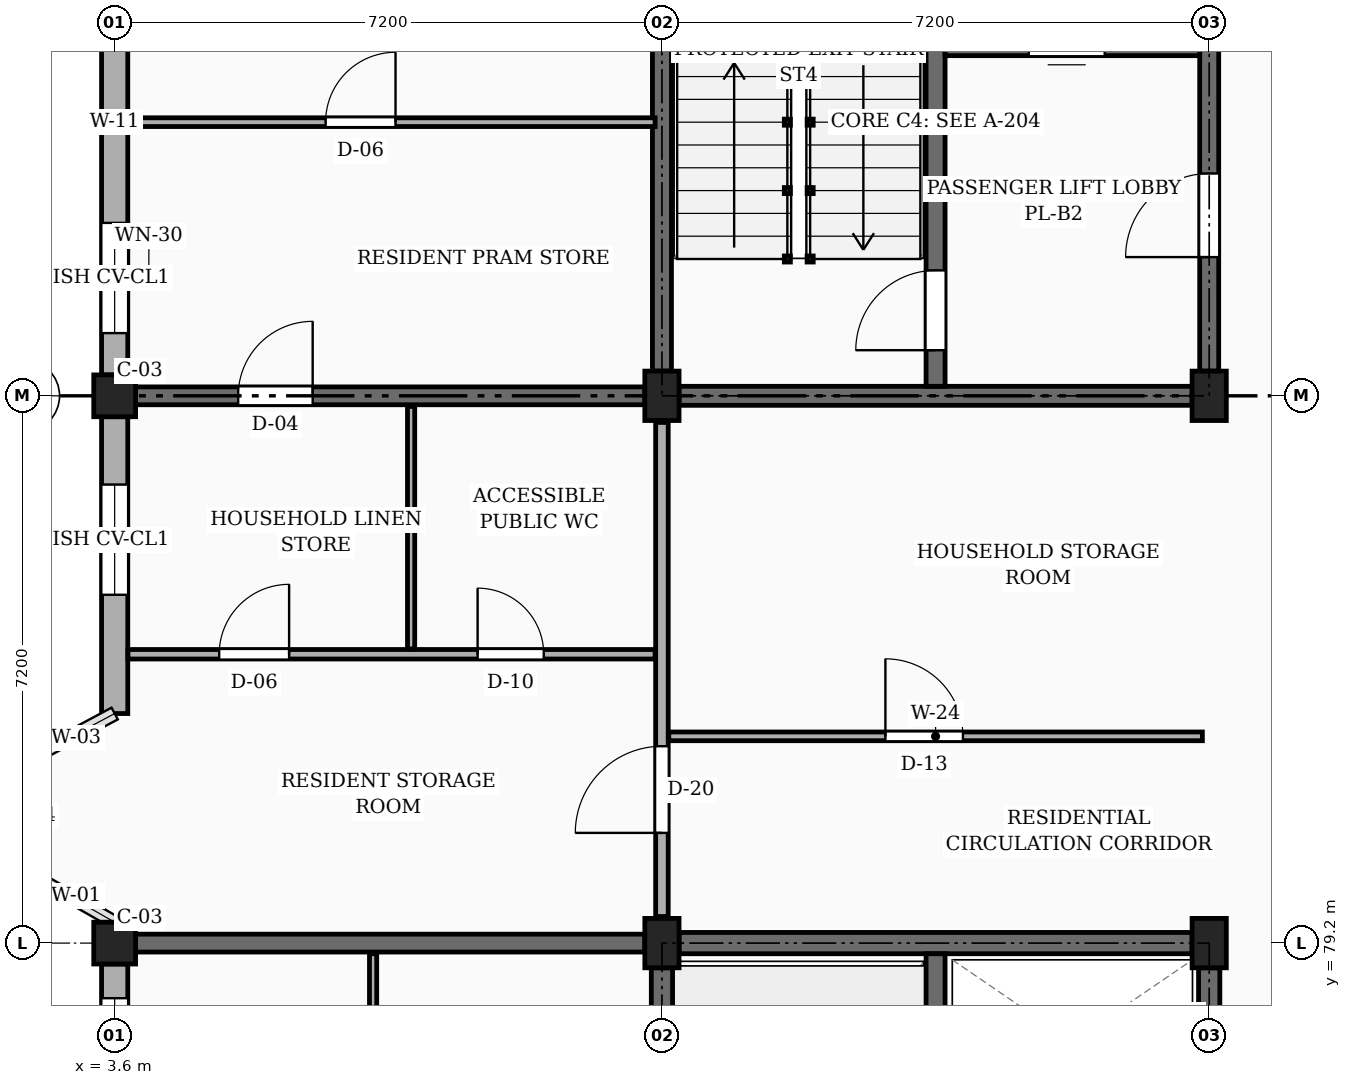
"""IFC4 building model, lengths in metres.
Left out: names, types, materials, properties, quantities, classifications, styles, units other than length and angle.
Written with IfcOpenShell. Run it as: python <this file> out.ifc"""

import sys

from ifc_helpers import new_model, si_unit, direction, frame, frame_2d, origin, origin_2d, place, context, subcontext, project, spatial, rectangle, extrude, element, fill, save


model = new_model("IFC4")
c1 = context("Model", 3, precision=1e-05, world=origin(), true_north=direction((0.0, 1.0)))
c2 = subcontext(c1, "Body", "Model", "MODEL_VIEW")
j1 = project(units=[si_unit("LENGTHUNIT", "METRE"), si_unit("PLANEANGLEUNIT", "RADIAN")], contexts=[c1])
p1 = place(None, origin())
s1 = spatial("IfcSite", under=j1, at=p1, CompositionType="ELEMENT")
p2 = place(p1, origin())
s2 = spatial("IfcBuilding", under=s1, at=p2, CompositionType="ELEMENT")
p3 = place(p2, frame((0.0, 0.0, 20.25)))
s3 = spatial("IfcBuildingStorey", under=s2, at=p3, CompositionType="ELEMENT", Elevation=20.25)
for number, where, z_axis, x_axis in (
    (1, (3.6, 79.2, 0.0), (0.0, 0.0, 1.0), (1.0, 0.0, 0.0)),
    (2, (3.6, 86.4, 0.0), (0.0, 0.0, 1.0), (1.0, 0.0, 0.0)),
):
    element("IfcColumn", number, at=place(p3, frame(where, z_axis=z_axis, x_axis=x_axis)), inside=s3, PredefinedType="COLUMN", context=c2, shape_type="SweptSolid", body=[
        extrude(rectangle(XDim=0.55, YDim=0.55, at=origin_2d()), origin(), (0.0, 0.0, 1.0), 3.15),
    ])
for number, where, z_axis, x_axis in (
    (3, (10.8, 79.2, 0.0), (0.0, 0.0, 1.0), (1.0, 0.0, 0.0)),
    (4, (10.8, 86.4, 0.0), (0.0, 0.0, 1.0), (1.0, 0.0, 0.0)),
    (5, (18.0, 79.2, 0.0), (0.0, 0.0, 1.0), (1.0, 0.0, 0.0)),
    (6, (18.0, 86.4, 0.0), (0.0, 0.0, 1.0), (1.0, 0.0, 0.0)),
):
    element("IfcColumn", number, at=place(p3, frame(where, z_axis=z_axis, x_axis=x_axis)), inside=s3, PredefinedType="COLUMN", context=c2, shape_type="SweptSolid", body=[
        extrude(rectangle(XDim=0.45, YDim=0.65, at=origin_2d()), origin(), (0.0, 0.0, 1.0), 3.15),
    ])
p4 = place(p3, frame((3.875, 79.2, 0.0), z_axis=(0.0, 0.0, 1.0), x_axis=(1.0, 0.0, 0.0)))
e7 = element("IfcWall", 7, at=p4, inside=s3, PredefinedType="SOLIDWALL", context=c2, shape_type="SweptSolid", body=[
    extrude(rectangle(XDim=6.7, YDim=0.235, at=frame_2d((3.35, 0.0))), origin(), (0.0, 0.0, 1.0), 2.21),
])
p5 = place(p3, frame((3.875, 86.4, 0.0), z_axis=(0.0, 0.0, 1.0), x_axis=(1.0, 0.0, 0.0)))
e8 = element("IfcWall", 8, at=p5, inside=s3, PredefinedType="SOLIDWALL", context=c2, shape_type="SweptSolid", body=[
    extrude(rectangle(XDim=6.7, YDim=0.235, at=frame_2d((3.35, 0.0))), origin(), (0.0, 0.0, 1.0), 2.21),
])
p6 = place(p5, frame((1.35, 0.0, 0.0)))
e9 = element("IfcOpeningElement", 9, at=p6, cuts=e8, PredefinedType="OPENING", context=c2, shape_type="SweptSolid", body=[
    extrude(rectangle(XDim=0.98, YDim=2.12, at=frame_2d((0.49, 1.06))), frame((0.0, 0.127, 0.0), z_axis=(0.0, -1.0, 0.0), x_axis=(1.0, 0.0, 0.0)), (0.0, 0.0, 1.0), 0.255),
])
p7 = place(p3, frame((3.6, 93.325, 0.0), z_axis=(0.0, 0.0, 1.0), x_axis=(0.0, -1.0, 0.0)))
e10 = element("IfcWall", 10, at=p7, inside=s3, PredefinedType="SOLIDWALL", context=c2, shape_type="SweptSolid", body=[
    extrude(rectangle(XDim=6.65, YDim=0.345, at=frame_2d((3.325, 0.0))), origin(), (0.0, 0.0, 1.0), 2.48),
])
p8 = place(p7, frame((0.45, 0.0, 0.78)))
e11 = element("IfcOpeningElement", 11, at=p8, cuts=e10, PredefinedType="OPENING", context=c2, shape_type="SweptSolid", body=[
    extrude(rectangle(XDim=1.25, YDim=1.44, at=frame_2d((0.625, 0.72))), frame((0.0, 0.183, 0.0), z_axis=(0.0, -1.0, 0.0), x_axis=(1.0, 0.0, 0.0)), (0.0, 0.0, 1.0), 0.365),
])
p9 = place(p7, frame((4.65, 0.0, 0.78)))
e12 = element("IfcOpeningElement", 12, at=p9, cuts=e10, PredefinedType="OPENING", context=c2, shape_type="SweptSolid", body=[
    extrude(rectangle(XDim=1.45, YDim=1.44, at=frame_2d((0.725, 0.72))), frame((0.0, 0.183, 0.0), z_axis=(0.0, -1.0, 0.0), x_axis=(1.0, 0.0, 0.0)), (0.0, 0.0, 1.0), 0.365),
])
p10 = place(p3, frame((3.6, 86.125, 0.0), z_axis=(0.0, 0.0, 1.0), x_axis=(0.0, -1.0, 0.0)))
e13 = element("IfcWall", 13, at=p10, inside=s3, PredefinedType="SOLIDWALL", context=c2, shape_type="SweptSolid", body=[
    extrude(rectangle(XDim=3.905, YDim=0.345, at=frame_2d((1.953, 0.0))), origin(), (0.0, 0.0, 1.0), 2.48),
])
p11 = place(p10, frame((0.893, 0.0, 0.78)))
e14 = element("IfcOpeningElement", 14, at=p11, cuts=e13, PredefinedType="OPENING", context=c2, shape_type="SweptSolid", body=[
    extrude(rectangle(XDim=1.45, YDim=1.44, at=frame_2d((0.725, 0.72))), frame((0.0, 0.183, 0.0), z_axis=(0.0, -1.0, 0.0), x_axis=(1.0, 0.0, 0.0)), (0.0, 0.0, 1.0), 0.365),
])
p12 = place(p3, frame((3.6, 78.925, 0.0), z_axis=(0.0, 0.0, 1.0), x_axis=(0.0, -1.0, 0.0)))
e15 = element("IfcWall", 15, at=p12, inside=s3, PredefinedType="SOLIDWALL", context=c2, shape_type="SweptSolid", body=[
    extrude(rectangle(XDim=6.65, YDim=0.345, at=frame_2d((3.325, 0.0))), origin(), (0.0, 0.0, 1.0), 2.48),
])
p13 = place(p12, frame((0.45, 0.0, 0.78)))
e16 = element("IfcOpeningElement", 16, at=p13, cuts=e15, PredefinedType="OPENING", context=c2, shape_type="SweptSolid", body=[
    extrude(rectangle(XDim=0.85, YDim=1.15, at=frame_2d((0.425, 0.575))), frame((0.0, 0.183, 0.0), z_axis=(0.0, -1.0, 0.0), x_axis=(1.0, 0.0, 0.0)), (0.0, 0.0, 1.0), 0.365),
])
p14 = place(p12, frame((4.65, 0.0, 0.78)))
e17 = element("IfcOpeningElement", 17, at=p14, cuts=e15, PredefinedType="OPENING", context=c2, shape_type="SweptSolid", body=[
    extrude(rectangle(XDim=1.0, YDim=1.15, at=frame_2d((0.5, 0.575))), frame((0.0, 0.183, 0.0), z_axis=(0.0, -1.0, 0.0), x_axis=(1.0, 0.0, 0.0)), (0.0, 0.0, 1.0), 0.365),
])
p15 = place(p3, frame((10.8, 72.325, 0.0), z_axis=(0.0, 0.0, 1.0), x_axis=(0.0, 1.0, 0.0)))
e18 = element("IfcWall", 18, at=p15, inside=s3, PredefinedType="SHEAR", context=c2, shape_type="SweptSolid", body=[
    extrude(rectangle(XDim=6.55, YDim=0.28, at=frame_2d((3.275, 0.0))), origin(), (0.0, 0.0, 1.0), 2.91),
])
p16 = place(p3, frame((11.025, 79.2, 0.0), z_axis=(0.0, 0.0, 1.0), x_axis=(1.0, 0.0, 0.0)))
e19 = element("IfcWall", 19, at=p16, inside=s3, PredefinedType="SHEAR", context=c2, shape_type="SweptSolid", body=[
    extrude(rectangle(XDim=6.75, YDim=0.28, at=frame_2d((3.375, 0.0))), origin(), (0.0, 0.0, 1.0), 2.91),
])
p17 = place(p3, frame((18.0, 72.325, 0.0), z_axis=(0.0, 0.0, 1.0), x_axis=(0.0, 1.0, 0.0)))
e20 = element("IfcWall", 20, at=p17, inside=s3, PredefinedType="SHEAR", context=c2, shape_type="SweptSolid", body=[
    extrude(rectangle(XDim=6.55, YDim=0.28, at=frame_2d((3.275, 0.0))), origin(), (0.0, 0.0, 1.0), 2.91),
])
p18 = place(p17, frame((1.5, 0.0, 0.0)))
e21 = element("IfcOpeningElement", 21, at=p18, cuts=e20, PredefinedType="OPENING", context=c2, shape_type="SweptSolid", body=[
    extrude(rectangle(XDim=1.1, YDim=2.15, at=frame_2d((0.55, 1.075))), frame((0.0, 0.15, 0.0), z_axis=(0.0, -1.0, 0.0), x_axis=(1.0, 0.0, 0.0)), (0.0, 0.0, 1.0), 0.3),
])
p19 = place(p3, frame((14.4, 72.14, 0.0), z_axis=(0.0, 0.0, 1.0), x_axis=(0.0, 1.0, 0.0)))
e22 = element("IfcWall", 22, at=p19, inside=s3, PredefinedType="SHEAR", context=c2, shape_type="SweptSolid", body=[
    extrude(rectangle(XDim=6.92, YDim=0.25, at=frame_2d((3.46, 0.0))), origin(), (0.0, 0.0, 1.0), 2.91),
])
p20 = place(p19, frame((0.46, 0.0, 0.0)))
e23 = element("IfcOpeningElement", 23, at=p20, cuts=e22, PredefinedType="OPENING", context=c2, shape_type="SweptSolid", body=[
    extrude(rectangle(XDim=1.05, YDim=2.15, at=frame_2d((0.525, 1.075))), frame((0.0, 0.135, 0.0), z_axis=(0.0, -1.0, 0.0), x_axis=(1.0, 0.0, 0.0)), (0.0, 0.0, 1.0), 0.27),
])
p21 = place(p3, frame((10.8, 86.725, 0.0), z_axis=(0.0, 0.0, 1.0), x_axis=(0.0, 1.0, 0.0)))
e24 = element("IfcWall", 24, at=p21, inside=s3, PredefinedType="SHEAR", context=c2, shape_type="SweptSolid", body=[
    extrude(rectangle(XDim=6.6, YDim=0.25, at=frame_2d((3.3, 0.0))), origin(), (0.0, 0.0, 1.0), 2.91),
])
p22 = place(p3, frame((18.0, 86.725, 0.0), z_axis=(0.0, 0.0, 1.0), x_axis=(0.0, 1.0, 0.0)))
e25 = element("IfcWall", 25, at=p22, inside=s3, PredefinedType="SHEAR", context=c2, shape_type="SweptSolid", body=[
    extrude(rectangle(XDim=6.6, YDim=0.25, at=frame_2d((3.3, 0.0))), origin(), (0.0, 0.0, 1.0), 2.91),
])
p23 = place(p22, frame((1.5, 0.0, 0.0)))
e26 = element("IfcOpeningElement", 26, at=p23, cuts=e25, PredefinedType="OPENING", context=c2, shape_type="SweptSolid", body=[
    extrude(rectangle(XDim=1.1, YDim=2.15, at=frame_2d((0.55, 1.075))), frame((0.0, 0.135, 0.0), z_axis=(0.0, -1.0, 0.0), x_axis=(1.0, 0.0, 0.0)), (0.0, 0.0, 1.0), 0.27),
])
p24 = place(p3, frame((11.025, 86.4, 0.0), z_axis=(0.0, 0.0, 1.0), x_axis=(1.0, 0.0, 0.0)))
e27 = element("IfcWall", 27, at=p24, inside=s3, PredefinedType="SHEAR", context=c2, shape_type="SweptSolid", body=[
    extrude(rectangle(XDim=6.75, YDim=0.25, at=frame_2d((3.375, 0.0))), origin(), (0.0, 0.0, 1.0), 2.91),
])
p25 = place(p3, frame((14.4, 86.525, 0.0), z_axis=(0.0, 0.0, 1.0), x_axis=(0.0, 1.0, 0.0)))
e28 = element("IfcWall", 28, at=p25, inside=s3, PredefinedType="SHEAR", context=c2, shape_type="SweptSolid", body=[
    extrude(rectangle(XDim=6.915, YDim=0.25, at=frame_2d((3.458, 0.0))), origin(), (0.0, 0.0, 1.0), 2.91),
])
p26 = place(p25, frame((0.475, 0.0, 0.0)))
e29 = element("IfcOpeningElement", 29, at=p26, cuts=e28, PredefinedType="OPENING", context=c2, shape_type="SweptSolid", body=[
    extrude(rectangle(XDim=1.05, YDim=2.15, at=frame_2d((0.525, 1.075))), frame((0.0, 0.135, 0.0), z_axis=(0.0, -1.0, 0.0), x_axis=(1.0, 0.0, 0.0)), (0.0, 0.0, 1.0), 0.27),
])
p27 = place(p3, frame((14.525, 91.0, 0.0), z_axis=(0.0, 0.0, 1.0), x_axis=(1.0, 0.0, 0.0)))
e30 = element("IfcWall", 30, at=p27, inside=s3, PredefinedType="SHEAR", context=c2, shape_type="SweptSolid", body=[
    extrude(rectangle(XDim=3.35, YDim=0.25, at=frame_2d((1.675, 0.0))), origin(), (0.0, 0.0, 1.0), 2.91),
])
p28 = place(p27, frame((1.1, 0.0, 0.0)))
e31 = element("IfcOpeningElement", 31, at=p28, cuts=e30, PredefinedType="OPENING", context=c2, shape_type="SweptSolid", body=[
    extrude(rectangle(XDim=1.0, YDim=2.2, at=frame_2d((0.5, 1.1))), frame((0.0, 0.135, 0.0), z_axis=(0.0, -1.0, 0.0), x_axis=(1.0, 0.0, 0.0)), (0.0, 0.0, 1.0), 0.27),
])
p29 = place(p3, frame((10.8, 79.55, 0.0), z_axis=(0.0, 0.0, 1.0), x_axis=(0.0, 1.0, 0.0)))
e32 = element("IfcWall", 32, at=p29, inside=s3, PredefinedType="PARTITIONING", context=c2, shape_type="SweptSolid", body=[
    extrude(rectangle(XDim=6.5, YDim=0.165, at=frame_2d((3.25, 0.0))), origin(), (0.0, 0.0, 1.0), 2.345),
])
p30 = place(p29, frame((1.1, 0.0, 0.0)))
e33 = element("IfcOpeningElement", 33, at=p30, cuts=e32, PredefinedType="OPENING", context=c2, shape_type="SweptSolid", body=[
    extrude(rectangle(XDim=1.14, YDim=2.18, at=frame_2d((0.57, 1.09))), frame((0.0, 0.093, 0.0), z_axis=(0.0, -1.0, 0.0), x_axis=(1.0, 0.0, 0.0)), (0.0, 0.0, 1.0), 0.185),
])
p31 = place(p3, frame((7.0, 75.37, 0.0), z_axis=(0.0, 0.0, 1.0), x_axis=(0.0, 1.0, 0.0)))
e34 = element("IfcWall", 34, at=p31, inside=s3, PredefinedType="PARTITIONING", context=c2, shape_type="SweptSolid", body=[
    extrude(rectangle(XDim=3.69, YDim=0.095, at=frame_2d((1.845, 0.0))), origin(), (0.0, 0.0, 1.0), 2.345),
])
p32 = place(p3, frame((10.89, 81.92, 0.0), z_axis=(0.0, 0.0, 1.0), x_axis=(1.0, 0.0, 0.0)))
e35 = element("IfcWall", 35, at=p32, inside=s3, PredefinedType="PARTITIONING", context=c2, shape_type="SweptSolid", body=[
    extrude(rectangle(XDim=7.02, YDim=0.115, at=frame_2d((3.51, 0.0))), origin(), (0.0, 0.0, 1.0), 2.345),
])
p33 = place(p32, frame((2.85, 0.0, 0.0)))
e36 = element("IfcOpeningElement", 36, at=p33, cuts=e35, PredefinedType="OPENING", context=c2, shape_type="SweptSolid", body=[
    extrude(rectangle(XDim=1.02, YDim=2.15, at=frame_2d((0.51, 1.075))), frame((0.0, 0.067, 0.0), z_axis=(0.0, -1.0, 0.0), x_axis=(1.0, 0.0, 0.0)), (0.0, 0.0, 1.0), 0.135),
])
p34 = place(p3, frame((3.775, 83.0, 0.0), z_axis=(0.0, 0.0, 1.0), x_axis=(1.0, 0.0, 0.0)))
e37 = element("IfcWall", 37, at=p34, inside=s3, PredefinedType="PARTITIONING", context=c2, shape_type="SweptSolid", body=[
    extrude(rectangle(XDim=6.935, YDim=0.125, at=frame_2d((3.468, 0.0))), origin(), (0.0, 0.0, 1.0), 2.345),
])
p35 = place(p34, frame((4.6, 0.0, 0.0)))
e38 = element("IfcOpeningElement", 38, at=p35, cuts=e37, PredefinedType="OPENING", context=c2, shape_type="SweptSolid", body=[
    extrude(rectangle(XDim=0.87, YDim=2.05, at=frame_2d((0.435, 1.025))), frame((0.0, 0.073, 0.0), z_axis=(0.0, -1.0, 0.0), x_axis=(1.0, 0.0, 0.0)), (0.0, 0.0, 1.0), 0.145),
])
p36 = place(p34, frame((1.2, 0.0, 0.0)))
e39 = element("IfcOpeningElement", 39, at=p36, cuts=e37, PredefinedType="OPENING", context=c2, shape_type="SweptSolid", body=[
    extrude(rectangle(XDim=0.92, YDim=2.1, at=frame_2d((0.46, 1.05))), frame((0.0, 0.073, 0.0), z_axis=(0.0, -1.0, 0.0), x_axis=(1.0, 0.0, 0.0)), (0.0, 0.0, 1.0), 0.145),
])
p37 = place(p3, frame((7.5, 83.07, 0.0), z_axis=(0.0, 0.0, 1.0), x_axis=(0.0, 1.0, 0.0)))
e40 = element("IfcWall", 40, at=p37, inside=s3, PredefinedType="PARTITIONING", context=c2, shape_type="SweptSolid", body=[
    extrude(rectangle(XDim=3.19, YDim=0.095, at=frame_2d((1.595, 0.0))), origin(), (0.0, 0.0, 1.0), 2.345),
])
p38 = place(p3, frame((3.775, 90.0, 0.0), z_axis=(0.0, 0.0, 1.0), x_axis=(1.0, 0.0, 0.0)))
e41 = element("IfcWall", 41, at=p38, inside=s3, PredefinedType="PARTITIONING", context=c2, shape_type="SweptSolid", body=[
    extrude(rectangle(XDim=6.935, YDim=0.115, at=frame_2d((3.468, 0.0))), origin(), (0.0, 0.0, 1.0), 2.345),
])
p39 = place(p38, frame((2.6, 0.0, 0.0)))
e42 = element("IfcOpeningElement", 42, at=p39, cuts=e41, PredefinedType="OPENING", context=c2, shape_type="SweptSolid", body=[
    extrude(rectangle(XDim=0.92, YDim=2.1, at=frame_2d((0.46, 1.05))), frame((0.0, 0.067, 0.0), z_axis=(0.0, -1.0, 0.0), x_axis=(1.0, 0.0, 0.0)), (0.0, 0.0, 1.0), 0.135),
])
p40 = place(p9, origin())
e43 = element("IfcWindow", 43, at=p40, inside=s3, PartitioningType="SINGLE_PANEL", PredefinedType="WINDOW", context=c2, shape_type="SweptSolid", body=[
    extrude(rectangle(XDim=1.45, YDim=1.44, at=frame_2d((0.725, 0.72))), frame((0.0, 0.03, 0.0), z_axis=(0.0, -1.0, 0.0), x_axis=(1.0, 0.0, 0.0)), (0.0, 0.0, 1.0), 0.06),
])
fill(e12, e43)
p41 = place(p11, origin())
e44 = element("IfcWindow", 44, at=p41, inside=s3, PartitioningType="SINGLE_PANEL", PredefinedType="WINDOW", context=c2, shape_type="SweptSolid", body=[
    extrude(rectangle(XDim=1.45, YDim=1.44, at=frame_2d((0.725, 0.72))), frame((0.0, 0.03, 0.0), z_axis=(0.0, -1.0, 0.0), x_axis=(1.0, 0.0, 0.0)), (0.0, 0.0, 1.0), 0.06),
])
fill(e14, e44)
p42 = place(p13, origin())
e45 = element("IfcWindow", 45, at=p42, inside=s3, PartitioningType="SINGLE_PANEL", PredefinedType="WINDOW", context=c2, shape_type="SweptSolid", body=[
    extrude(rectangle(XDim=0.85, YDim=1.15, at=frame_2d((0.425, 0.575))), frame((0.0, 0.03, 0.0), z_axis=(0.0, -1.0, 0.0), x_axis=(1.0, 0.0, 0.0)), (0.0, 0.0, 1.0), 0.06),
])
fill(e16, e45)
p43 = place(p23, frame((1.1, 0.0, 0.0), z_axis=(0.0, 0.0, 1.0), x_axis=(-1.0, 0.0, 0.0)))
e46 = element("IfcDoor", 46, at=p43, inside=s3, OperationType="SINGLE_SWING_LEFT", PredefinedType="DOOR", context=c2, shape_type="SweptSolid", body=[
    extrude(rectangle(XDim=1.1, YDim=2.15, at=frame_2d((0.55, 1.075))), frame((0.0, 0.025, 0.0), z_axis=(0.0, -1.0, 0.0), x_axis=(1.0, 0.0, 0.0)), (0.0, 0.0, 1.0), 0.05),
])
fill(e26, e46)
p44 = place(p26, origin())
e47 = element("IfcDoor", 47, at=p44, inside=s3, OperationType="SINGLE_SWING_LEFT", PredefinedType="DOOR", context=c2, shape_type="SweptSolid", body=[
    extrude(rectangle(XDim=1.05, YDim=2.15, at=frame_2d((0.525, 1.075))), frame((0.0, 0.025, 0.0), z_axis=(0.0, -1.0, 0.0), x_axis=(1.0, 0.0, 0.0)), (0.0, 0.0, 1.0), 0.05),
])
fill(e29, e47)
p45 = place(p30, origin())
e48 = element("IfcDoor", 48, at=p45, inside=s3, OperationType="SINGLE_SWING_LEFT", PredefinedType="DOOR", context=c2, shape_type="SweptSolid", body=[
    extrude(rectangle(XDim=1.14, YDim=2.18, at=frame_2d((0.57, 1.09))), frame((0.0, 0.025, 0.0), z_axis=(0.0, -1.0, 0.0), x_axis=(1.0, 0.0, 0.0)), (0.0, 0.0, 1.0), 0.05),
])
fill(e33, e48)
p46 = place(p33, origin())
e49 = element("IfcDoor", 49, at=p46, inside=s3, OperationType="SINGLE_SWING_LEFT", PredefinedType="DOOR", context=c2, shape_type="SweptSolid", body=[
    extrude(rectangle(XDim=1.02, YDim=2.15, at=frame_2d((0.51, 1.075))), frame((0.0, 0.025, 0.0), z_axis=(0.0, -1.0, 0.0), x_axis=(1.0, 0.0, 0.0)), (0.0, 0.0, 1.0), 0.05),
])
fill(e36, e49)
p47 = place(p35, origin())
e50 = element("IfcDoor", 50, at=p47, inside=s3, OperationType="SINGLE_SWING_LEFT", PredefinedType="DOOR", context=c2, shape_type="SweptSolid", body=[
    extrude(rectangle(XDim=0.87, YDim=2.05, at=frame_2d((0.435, 1.025))), frame((0.0, 0.025, 0.0), z_axis=(0.0, -1.0, 0.0), x_axis=(1.0, 0.0, 0.0)), (0.0, 0.0, 1.0), 0.05),
])
fill(e38, e50)
p48 = place(p36, origin())
e51 = element("IfcDoor", 51, at=p48, inside=s3, OperationType="SINGLE_SWING_RIGHT", PredefinedType="DOOR", context=c2, shape_type="SweptSolid", body=[
    extrude(rectangle(XDim=0.92, YDim=2.1, at=frame_2d((0.46, 1.05))), frame((0.0, 0.025, 0.0), z_axis=(0.0, -1.0, 0.0), x_axis=(1.0, 0.0, 0.0)), (0.0, 0.0, 1.0), 0.05),
])
fill(e39, e51)
p49 = place(p39, origin())
e52 = element("IfcDoor", 52, at=p49, inside=s3, OperationType="SINGLE_SWING_RIGHT", PredefinedType="DOOR", context=c2, shape_type="SweptSolid", body=[
    extrude(rectangle(XDim=0.92, YDim=2.1, at=frame_2d((0.46, 1.05))), frame((0.0, 0.025, 0.0), z_axis=(0.0, -1.0, 0.0), x_axis=(1.0, 0.0, 0.0)), (0.0, 0.0, 1.0), 0.05),
])
fill(e42, e52)
p50 = place(p6, origin())
e53 = element("IfcDoor", 53, at=p50, inside=s3, OperationType="SINGLE_SWING_RIGHT", PredefinedType="DOOR", context=c2, shape_type="SweptSolid", body=[
    extrude(rectangle(XDim=0.98, YDim=2.12, at=frame_2d((0.49, 1.06))), frame((0.0, 0.025, 0.0), z_axis=(0.0, -1.0, 0.0), x_axis=(1.0, 0.0, 0.0)), (0.0, 0.0, 1.0), 0.05),
])
fill(e9, e53)
save(model, sys.argv[1])
